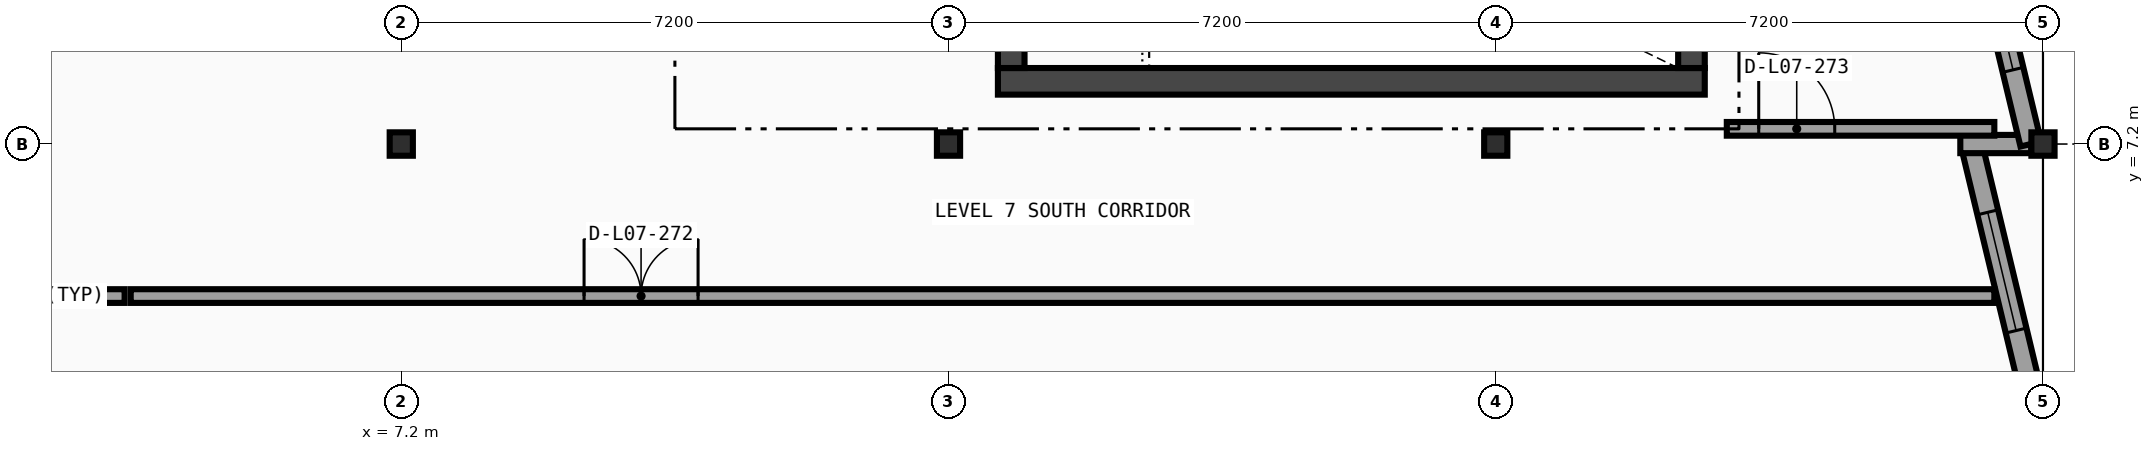
"""IFC4 building model, lengths in metres.
Left out: names, types, materials, properties, quantities, classifications, styles, units other than length and angle.
Written with IfcOpenShell. Run it as: python <this file> out.ifc"""

import sys

from ifc_helpers import new_model, si_unit, direction, frame, frame_2d, origin, origin_2d, place, context, subcontext, project, spatial, rectangle, i_section, extrude, element, fill, save


model = new_model("IFC4")
c1 = context("Model", 3, precision=1e-05, world=origin(), true_north=direction((0.0, 1.0)))
c2 = subcontext(c1, "Body", "Model", "MODEL_VIEW")
j1 = project(units=[si_unit("LENGTHUNIT", "METRE"), si_unit("PLANEANGLEUNIT", "RADIAN")], contexts=[c1])
p1 = place(None, origin())
s1 = spatial("IfcSite", under=j1, at=p1, CompositionType="ELEMENT")
p2 = place(p1, origin())
s2 = spatial("IfcBuilding", under=s1, at=p2, CompositionType="ELEMENT")
p3 = place(p2, frame((0.0, 0.0, 31.05)))
s3 = spatial("IfcBuildingStorey", under=s2, at=p3, CompositionType="ELEMENT", Elevation=31.05)
for number, where, z_axis, x_axis in (
    (1, (7.2, 7.2, 0.0), (0.0, 0.0, 1.0), (1.0, 0.0, 0.0)),
    (2, (14.4, 7.2, 0.0), (0.0, 0.0, 1.0), (1.0, 0.0, 0.0)),
    (3, (21.6, 7.2, 0.0), (0.0, 0.0, 1.0), (1.0, 0.0, 0.0)),
    (4, (28.8, 7.2, 0.0), (0.0, 0.0, 1.0), (1.0, 0.0, 0.0)),
):
    element("IfcColumn", number, at=place(p3, frame(where, z_axis=z_axis, x_axis=x_axis)), inside=s3, PredefinedType="COLUMN", context=c2, shape_type="SweptSolid", body=[
        extrude(i_section(OverallWidth=0.305, OverallDepth=0.308, WebThickness=0.01, FlangeThickness=0.015, FilletRadius=0.015, at=origin_2d()), origin(), (0.0, 0.0, 1.0), 4.2),
    ])
p4 = place(p3, frame((28.64, 3.94, 0.0), z_axis=(0.0, 0.0, 1.0), x_axis=(-0.233443812137, 0.972370292931, 0.0)))
e5 = element("IfcWall", 5, at=p4, inside=s3, PredefinedType="SOLIDWALL", context=c2, shape_type="SweptSolid", body=[
    extrude(rectangle(XDim=3.258, YDim=0.28, at=frame_2d((1.629, 0.0))), origin(), (0.0, 0.0, 1.0), 3.95),
])
p5 = place(p4, frame((0.829, 0.0, 0.8)))
e6 = element("IfcOpeningElement", 6, at=p5, cuts=e5, PredefinedType="OPENING", context=c2, shape_type="SweptSolid", body=[
    extrude(rectangle(XDim=1.6, YDim=1.75, at=frame_2d((0.8, 0.875))), frame((0.0, 0.15, 0.0), z_axis=(0.0, -1.0, 0.0), x_axis=(1.0, 0.0, 0.0)), (0.0, 0.0, 1.0), 0.3),
])
p6 = place(p3, frame((27.712, 7.2, 0.0), z_axis=(0.0, 0.0, 1.0), x_axis=(1.0, 0.0, 0.0)))
e7 = element("IfcWall", 7, at=p6, inside=s3, PredefinedType="SOLIDWALL", context=c2, shape_type="SweptSolid", body=[
    extrude(rectangle(XDim=0.933, YDim=0.24, at=frame_2d((0.467, 0.0))), origin(), (0.0, 0.0, 1.0), 3.95),
])
p7 = place(p3, frame((28.64, 7.2, 0.0), z_axis=(0.0, 0.0, 1.0), x_axis=(-0.233431827365, 0.972373170122, 0.0)))
e8 = element("IfcWall", 8, at=p7, inside=s3, PredefinedType="SOLIDWALL", context=c2, shape_type="SweptSolid", body=[
    extrude(rectangle(XDim=3.607, YDim=0.28, at=frame_2d((1.804, 0.0))), origin(), (0.0, 0.0, 1.0), 3.95),
])
p8 = place(p7, frame((1.004, 0.0, 0.8)))
e9 = element("IfcOpeningElement", 9, at=p8, cuts=e8, PredefinedType="OPENING", context=c2, shape_type="SweptSolid", body=[
    extrude(rectangle(XDim=1.6, YDim=1.75, at=frame_2d((0.8, 0.875))), frame((0.0, 0.15, 0.0), z_axis=(0.0, -1.0, 0.0), x_axis=(1.0, 0.0, 0.0)), (0.0, 0.0, 1.0), 0.3),
])
p9 = place(p3, frame((15.05, 8.025, 0.0), z_axis=(0.0, 0.0, 1.0), x_axis=(1.0, 0.0, 0.0)))
e10 = element("IfcWall", 10, at=p9, inside=s3, PredefinedType="SHEAR", context=c2, shape_type="SweptSolid", body=[
    extrude(rectangle(XDim=9.3, YDim=0.35, at=frame_2d((4.65, 0.0))), origin(), (0.0, 0.0, 1.0), 3.95),
])
p10 = place(p3, frame((15.225, 11.6, 0.0), z_axis=(0.0, 0.0, 1.0), x_axis=(0.0, -1.0, 0.0)))
e11 = element("IfcWall", 11, at=p10, inside=s3, PredefinedType="SHEAR", context=c2, shape_type="SweptSolid", body=[
    extrude(rectangle(XDim=3.4, YDim=0.35, at=frame_2d((1.7, 0.0))), origin(), (0.0, 0.0, 1.0), 3.95),
])
p11 = place(p10, frame((1.125, 0.0, 0.0)))
e12 = element("IfcOpeningElement", 12, at=p11, cuts=e11, PredefinedType="OPENING", context=c2, shape_type="SweptSolid", body=[
    extrude(rectangle(XDim=1.15, YDim=2.1, at=frame_2d((0.575, 1.05))), frame((0.0, 0.185, 0.0), z_axis=(0.0, -1.0, 0.0), x_axis=(1.0, 0.0, 0.0)), (0.0, 0.0, 1.0), 0.37),
])
p12 = place(p3, frame((24.175, 8.2, 0.0), z_axis=(0.0, 0.0, 1.0), x_axis=(0.0, 1.0, 0.0)))
e13 = element("IfcWall", 13, at=p12, inside=s3, PredefinedType="SHEAR", context=c2, shape_type="SweptSolid", body=[
    extrude(rectangle(XDim=3.4, YDim=0.35, at=frame_2d((1.7, 0.0))), origin(), (0.0, 0.0, 1.0), 3.95),
])
p13 = place(p3, frame((1.64, 5.2, 0.0), z_axis=(0.0, 0.0, 1.0), x_axis=(1.0, 0.0, 0.0)))
e14 = element("IfcWall", 14, at=p13, inside=s3, PredefinedType="PARTITIONING", context=c2, shape_type="SweptSolid", body=[
    extrude(rectangle(XDim=1.92, YDim=0.18, at=frame_2d((0.96, 0.0))), origin(), (0.0, 0.0, 1.0), 3.95),
])
p14 = place(p3, frame((3.64, 5.2, 0.0), z_axis=(0.0, 0.0, 1.0), x_axis=(1.0, 0.0, 0.0)))
e15 = element("IfcWall", 15, at=p14, inside=s3, PredefinedType="PARTITIONING", context=c2, shape_type="SweptSolid", body=[
    extrude(rectangle(XDim=24.52, YDim=0.18, at=frame_2d((12.26, 0.0))), origin(), (0.0, 0.0, 1.0), 3.95),
])
p15 = place(p14, frame((5.965, 0.0, 0.0)))
e16 = element("IfcOpeningElement", 16, at=p15, cuts=e15, PredefinedType="OPENING", context=c2, shape_type="SweptSolid", body=[
    extrude(rectangle(XDim=1.5, YDim=2.1, at=frame_2d((0.75, 1.05))), frame((0.0, 0.1, 0.0), z_axis=(0.0, -1.0, 0.0), x_axis=(1.0, 0.0, 0.0)), (0.0, 0.0, 1.0), 0.2),
])
p16 = place(p3, frame((24.64, 7.4, 0.0), z_axis=(0.0, 0.0, 1.0), x_axis=(1.0, 0.0, 0.0)))
e17 = element("IfcWall", 17, at=p16, inside=s3, PredefinedType="PARTITIONING", context=c2, shape_type="SweptSolid", body=[
    extrude(rectangle(XDim=3.52, YDim=0.18, at=frame_2d((1.76, 0.0))), origin(), (0.0, 0.0, 1.0), 3.95),
])
p17 = place(p16, frame((0.42, 0.0, 0.0)))
e18 = element("IfcOpeningElement", 18, at=p17, cuts=e17, PredefinedType="OPENING", context=c2, shape_type="SweptSolid", body=[
    extrude(rectangle(XDim=1.0, YDim=2.1, at=frame_2d((0.5, 1.05))), frame((0.0, 0.1, 0.0), z_axis=(0.0, -1.0, 0.0), x_axis=(1.0, 0.0, 0.0)), (0.0, 0.0, 1.0), 0.2),
])
p18 = place(p5, origin())
e19 = element("IfcWindow", 19, at=p18, inside=s3, PartitioningType="SINGLE_PANEL", PredefinedType="WINDOW", context=c2, shape_type="SweptSolid", body=[
    extrude(rectangle(XDim=1.6, YDim=1.75, at=frame_2d((0.8, 0.875))), frame((0.0, 0.03, 0.0), z_axis=(0.0, -1.0, 0.0), x_axis=(1.0, 0.0, 0.0)), (0.0, 0.0, 1.0), 0.06),
])
fill(e6, e19)
p19 = place(p8, origin())
e20 = element("IfcWindow", 20, at=p19, inside=s3, PartitioningType="SINGLE_PANEL", PredefinedType="WINDOW", context=c2, shape_type="SweptSolid", body=[
    extrude(rectangle(XDim=1.6, YDim=1.75, at=frame_2d((0.8, 0.875))), frame((0.0, 0.03, 0.0), z_axis=(0.0, -1.0, 0.0), x_axis=(1.0, 0.0, 0.0)), (0.0, 0.0, 1.0), 0.06),
])
fill(e9, e20)
p20 = place(p15, origin())
e21 = element("IfcDoor", 21, at=p20, inside=s3, OperationType="DOUBLE_DOOR_SINGLE_SWING", PredefinedType="DOOR", context=c2, shape_type="SweptSolid", body=[
    extrude(rectangle(XDim=1.5, YDim=2.1, at=frame_2d((0.75, 1.05))), frame((0.0, 0.025, 0.0), z_axis=(0.0, -1.0, 0.0), x_axis=(1.0, 0.0, 0.0)), (0.0, 0.0, 1.0), 0.05),
])
fill(e16, e21)
p21 = place(p17, origin())
e22 = element("IfcDoor", 22, at=p21, inside=s3, OperationType="SINGLE_SWING_LEFT", PredefinedType="DOOR", context=c2, shape_type="SweptSolid", body=[
    extrude(rectangle(XDim=1.0, YDim=2.1, at=frame_2d((0.5, 1.05))), frame((0.0, 0.025, 0.0), z_axis=(0.0, -1.0, 0.0), x_axis=(1.0, 0.0, 0.0)), (0.0, 0.0, 1.0), 0.05),
])
fill(e18, e22)
save(model, sys.argv[1])
